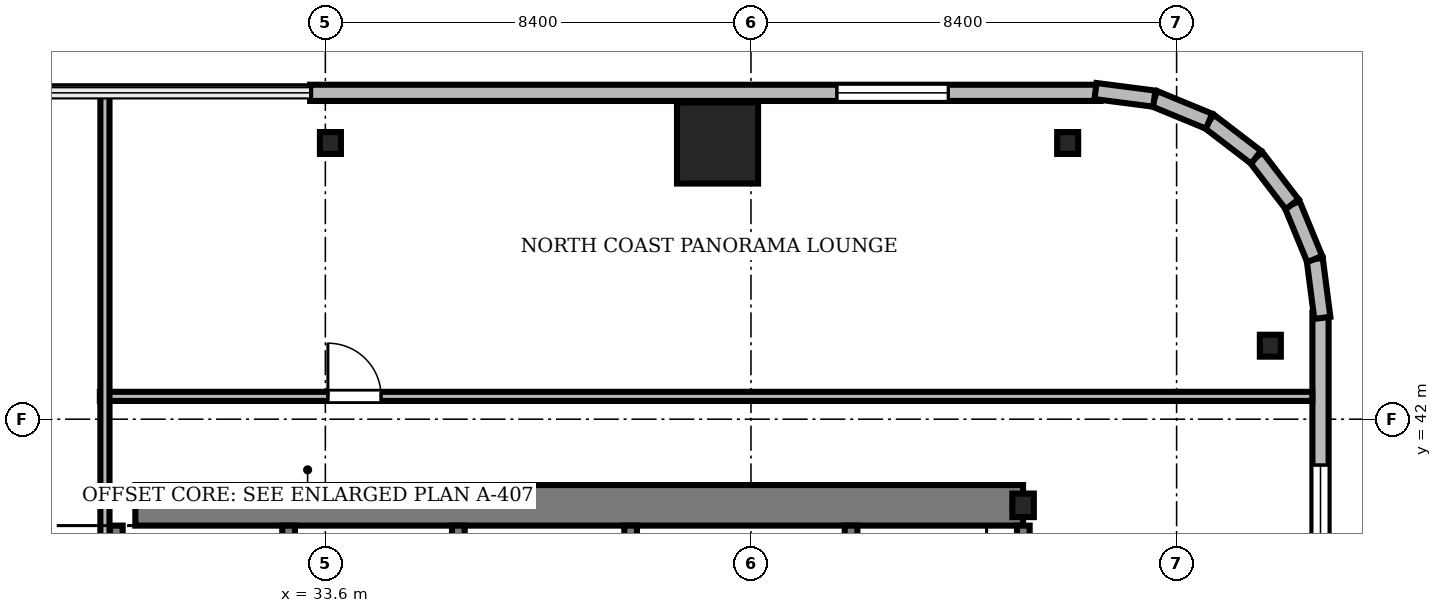
"""IFC4 building model, lengths in metres.
Left out: names, types, materials, properties, quantities, classifications, styles, units other than length and angle.
Written with IfcOpenShell. Run it as: python <this file> out.ifc"""

import sys

from ifc_helpers import new_model, si_unit, direction, frame, frame_2d, origin, origin_2d, place, context, subcontext, project, spatial, rectangle, i_section, extrude, source, transform, mapped, element, fill, save


model = new_model("IFC4")
c1 = context("Model", 3, precision=1e-05, world=origin(), true_north=direction((0.0, 1.0)))
c2 = subcontext(c1, "Body", "Model", "MODEL_VIEW")
j1 = project(units=[si_unit("LENGTHUNIT", "METRE"), si_unit("PLANEANGLEUNIT", "RADIAN")], contexts=[c1])
p1 = place(None, origin())
s1 = spatial("IfcSite", under=j1, at=p1, CompositionType="ELEMENT")
p2 = place(p1, origin())
s2 = spatial("IfcBuilding", under=s1, at=p2, CompositionType="ELEMENT")
p3 = place(p2, frame((0.0, 0.0, 122.4)))
s3 = spatial("IfcBuildingStorey", under=s2, at=p3, CompositionType="ELEMENT", Elevation=122.4)
m1 = source(origin(), c2, "Body", "SweptSolid", [
    extrude(rectangle(XDim=17.52, YDim=0.8, at=frame_2d((8.76, 0.0))), origin(), (0.0, 0.0, 1.0), 3.46),
])
p4 = place(p3, frame((29.85, 40.3, 0.0), z_axis=(0.0, 0.0, 1.0), x_axis=(1.0, 0.0, 0.0)))
e1 = element("IfcWall", 1, at=p4, inside=s3, PredefinedType="SHEAR", context=c2, shape_type="MappedRepresentation", body=[
    mapped(m1, transform((0.0, 0.0, 0.0), scale=1.0)),
])
m2 = source(origin(), c2, "Body", "SweptSolid", [
    extrude(i_section(OverallWidth=0.424, OverallDepth=0.465, WebThickness=0.035, FlangeThickness=0.056, FilletRadius=0.015, at=origin_2d()), origin(), (0.0, 0.0, 1.0), 3.46),
])
p5 = place(p3, frame((47.37, 40.3, 0.0), z_axis=(0.0, 0.0, 1.0), x_axis=(1.0, 0.0, 0.0)))
e2 = element("IfcColumn", 2, at=p5, inside=s3, PredefinedType="COLUMN", context=c2, shape_type="MappedRepresentation", body=[
    mapped(m2, transform((0.0, 0.0, 0.0), scale=1.0)),
])
m3 = source(origin(), c2, "Body", "SweptSolid", [
    extrude(rectangle(XDim=1.6, YDim=1.6, at=origin_2d()), origin(), (0.0, 0.0, 1.0), 3.46),
])
p6 = place(p3, frame((41.34, 47.45, 0.0), z_axis=(0.0, 0.0, 1.0), x_axis=(1.0, 0.0, 0.0)))
e3 = element("IfcColumn", 3, at=p6, inside=s3, PredefinedType="COLUMN", context=c2, shape_type="MappedRepresentation", body=[
    mapped(m3, transform((0.0, 0.0, 0.0), scale=1.0)),
])
m4 = source(origin(), c2, "Body", "SweptSolid", [
    extrude(i_section(OverallWidth=0.414, OverallDepth=0.432, WebThickness=0.026, FlangeThickness=0.04, FilletRadius=0.015, at=origin_2d()), origin(), (0.0, 0.0, 1.0), 3.46),
])
for number, where, z_axis, x_axis in (
    (4, (52.25, 43.45, 0.0), (0.0, 0.0, 1.0), (1.0, 0.0, 0.0)),
    (5, (48.25, 47.45, 0.0), (0.0, 0.0, 1.0), (1.0, 0.0, 0.0)),
    (6, (33.7, 47.45, 0.0), (0.0, 0.0, 1.0), (1.0, 0.0, 0.0)),
):
    element("IfcColumn", number, at=place(p3, frame(where, z_axis=z_axis, x_axis=x_axis)), inside=s3, PredefinedType="COLUMN", context=c2, shape_type="MappedRepresentation", body=[
        mapped(m4, transform((0.0, 0.0, 0.0), scale=1.0)),
    ])
m5 = source(origin(), c2, "Body", "SweptSolid", [
    extrude(rectangle(XDim=15.6, YDim=0.32, at=frame_2d((7.8, 0.0))), origin(), (0.0, 0.0, 1.0), 3.46),
])
p7 = place(p3, frame((48.9, 48.44, 0.0), z_axis=(0.0, 0.0, 1.0), x_axis=(-1.0, 0.0, 0.0)))
e7 = element("IfcWall", 7, at=p7, inside=s3, PredefinedType="SOLIDWALL", context=c2, shape_type="MappedRepresentation", body=[
    mapped(m5, transform((0.0, 0.0, 0.0), scale=1.0)),
])
m6 = source(origin(), c2, "Body", "SweptSolid", [
    extrude(rectangle(XDim=2.2, YDim=2.4, at=frame_2d((1.1, 1.2))), frame((0.0, 0.17, 0.0), z_axis=(0.0, -1.0, 0.0), x_axis=(1.0, 0.0, 0.0)), (0.0, 0.0, 1.0), 0.34),
])
p8 = place(p7, frame((3.005, 0.0, 0.72)))
e8 = element("IfcOpeningElement", 8, at=p8, cuts=e7, PredefinedType="OPENING", context=c2, shape_type="MappedRepresentation", body=[
    mapped(m6, transform((0.0, 0.0, 0.0), scale=1.0)),
])
m7 = source(origin(), c2, "Body", "SweptSolid", [
    extrude(rectangle(XDim=15.6, YDim=0.32, at=frame_2d((7.8, 0.0))), origin(), (0.0, 0.0, 1.0), 3.46),
])
p9 = place(p3, frame((53.24, 28.5, 0.0), z_axis=(0.0, 0.0, 1.0), x_axis=(0.0, 1.0, 0.0)))
e9 = element("IfcWall", 9, at=p9, inside=s3, PredefinedType="SOLIDWALL", context=c2, shape_type="MappedRepresentation", body=[
    mapped(m7, transform((0.0, 0.0, 0.0), scale=1.0)),
])
p10 = place(p9, frame((10.395, 0.0, 0.72)))
e10 = element("IfcOpeningElement", 10, at=p10, cuts=e9, PredefinedType="OPENING", context=c2, shape_type="MappedRepresentation", body=[
    mapped(m6, transform((0.0, 0.0, 0.0), scale=1.0)),
])
m8 = source(origin(), c2, "Body", "SweptSolid", [
    extrude(rectangle(XDim=1.17, YDim=0.32, at=frame_2d((0.585, 0.0))), origin(), (0.0, 0.0, 1.0), 3.46),
])
p11 = place(p3, frame((53.276, 44.0, 0.0), z_axis=(0.0, 0.0, 1.0), x_axis=(-0.128295670475, 0.991735963317, 0.0)))
e11 = element("IfcWall", 11, at=p11, inside=s3, PredefinedType="SOLIDWALL", context=c2, shape_type="MappedRepresentation", body=[
    mapped(m8, transform((0.0, 0.0, 0.0), scale=1.0)),
])
m9 = source(origin(), c2, "Body", "SweptSolid", [
    extrude(rectangle(XDim=1.169, YDim=0.32, at=frame_2d((0.584, 0.0))), origin(), (0.0, 0.0, 1.0), 3.46),
])
p12 = place(p3, frame((53.125, 45.16, 0.0), z_axis=(0.0, 0.0, 1.0), x_axis=(-0.381054331552, 0.924552646638, 0.0)))
e12 = element("IfcWall", 12, at=p12, inside=s3, PredefinedType="SOLIDWALL", context=c2, shape_type="MappedRepresentation", body=[
    mapped(m9, transform((0.0, 0.0, 0.0), scale=1.0)),
])
m10 = source(origin(), c2, "Body", "SweptSolid", [
    extrude(rectangle(XDim=1.169, YDim=0.32, at=frame_2d((0.584, 0.0))), origin(), (0.0, 0.0, 1.0), 3.46),
])
p13 = place(p3, frame((52.68, 46.241, 0.0), z_axis=(0.0, 0.0, 1.0), x_axis=(-0.608387696831, 0.793639975269, 0.0)))
e13 = element("IfcWall", 13, at=p13, inside=s3, PredefinedType="SOLIDWALL", context=c2, shape_type="MappedRepresentation", body=[
    mapped(m10, transform((0.0, 0.0, 0.0), scale=1.0)),
])
m11 = source(origin(), c2, "Body", "SweptSolid", [
    extrude(rectangle(XDim=1.169, YDim=0.32, at=frame_2d((0.584, 0.0))), origin(), (0.0, 0.0, 1.0), 3.46),
])
p14 = place(p3, frame((51.969, 47.169, 0.0), z_axis=(0.0, 0.0, 1.0), x_axis=(-0.793663520347, 0.608356981114, 0.0)))
e14 = element("IfcWall", 14, at=p14, inside=s3, PredefinedType="SOLIDWALL", context=c2, shape_type="MappedRepresentation", body=[
    mapped(m11, transform((0.0, 0.0, 0.0), scale=1.0)),
])
p15 = place(p3, frame((51.041, 47.88, 0.0), z_axis=(0.0, 0.0, 1.0), x_axis=(-0.924552646638, 0.381054331552, 0.0)))
e15 = element("IfcWall", 15, at=p15, inside=s3, PredefinedType="SOLIDWALL", context=c2, shape_type="MappedRepresentation", body=[
    mapped(m9, transform((0.0, 0.0, 0.0), scale=1.0)),
])
p16 = place(p3, frame((49.96, 48.325, 0.0), z_axis=(0.0, 0.0, 1.0), x_axis=(-0.991735963317, 0.128295670475, 0.0)))
e16 = element("IfcWall", 16, at=p16, inside=s3, PredefinedType="SOLIDWALL", context=c2, shape_type="MappedRepresentation", body=[
    mapped(m8, transform((0.0, 0.0, 0.0), scale=1.0)),
])
m12 = source(origin(), c2, "Body", "SweptSolid", [
    extrude(rectangle(XDim=9.25, YDim=0.25, at=frame_2d((4.625, 0.0))), origin(), (0.0, 0.0, 1.0), 3.5),
])
for number, where, z_axis, x_axis in (
    (17, (29.475, 30.65, 0.0), (0.0, 0.0, 1.0), (0.0, 1.0, 0.0)),
    (18, (32.875, 30.65, 0.0), (0.0, 0.0, 1.0), (0.0, 1.0, 0.0)),
    (19, (36.225, 30.65, 0.0), (0.0, 0.0, 1.0), (0.0, 1.0, 0.0)),
    (20, (39.625, 30.65, 0.0), (0.0, 0.0, 1.0), (0.0, 1.0, 0.0)),
    (21, (43.975, 30.65, 0.0), (0.0, 0.0, 1.0), (0.0, 1.0, 0.0)),
    (22, (47.375, 30.65, 0.0), (0.0, 0.0, 1.0), (0.0, 1.0, 0.0)),
):
    element("IfcWall", number, at=place(p3, frame(where, z_axis=z_axis, x_axis=x_axis)), inside=s3, PredefinedType="SOLIDWALL", context=c2, shape_type="MappedRepresentation", body=[
        mapped(m12, transform((0.0, 0.0, 0.0), scale=1.0)),
    ])
m13 = source(origin(), c2, "Body", "SweptSolid", [
    extrude(rectangle(XDim=23.928, YDim=0.18, at=frame_2d((11.964, 0.0))), origin(), (0.0, 0.0, 1.0), 2.702),
])
p17 = place(p3, frame((29.15, 42.45, 0.0), z_axis=(0.0, 0.0, 1.0), x_axis=(1.0, 0.0, 0.0)))
e23 = element("IfcWall", 23, at=p17, inside=s3, PredefinedType="PARTITIONING", context=c2, shape_type="MappedRepresentation", body=[
    mapped(m13, transform((0.0, 0.0, 0.0), scale=1.0)),
])
m14 = source(origin(), c2, "Body", "SweptSolid", [
    extrude(rectangle(XDim=1.05, YDim=2.2, at=frame_2d((0.525, 1.1))), frame((0.0, 0.1, 0.0), z_axis=(0.0, -1.0, 0.0), x_axis=(1.0, 0.0, 0.0)), (0.0, 0.0, 1.0), 0.2),
])
p18 = place(p17, frame((4.5, 0.0, 0.0)))
e24 = element("IfcOpeningElement", 24, at=p18, cuts=e23, PredefinedType="OPENING", context=c2, shape_type="MappedRepresentation", body=[
    mapped(m14, transform((0.0, 0.0, 0.0), scale=1.0)),
])
m15 = source(origin(), c2, "Body", "SweptSolid", [
    extrude(rectangle(XDim=11.45, YDim=0.18, at=frame_2d((5.725, 0.0))), origin(), (0.0, 0.0, 1.0), 2.702),
])
p19 = place(p3, frame((29.25, 37.02, 0.0), z_axis=(0.0, 0.0, 1.0), x_axis=(0.0, 1.0, 0.0)))
e25 = element("IfcWall", 25, at=p19, inside=s3, PredefinedType="PARTITIONING", context=c2, shape_type="MappedRepresentation", body=[
    mapped(m15, transform((0.0, 0.0, 0.0), scale=1.0)),
])
m16 = source(origin(), c2, "Body", "SweptSolid", [
    extrude(rectangle(XDim=2.2, YDim=2.4, at=frame_2d((1.1, 1.2))), frame((0.0, 0.03, 0.0), z_axis=(0.0, -1.0, 0.0), x_axis=(1.0, 0.0, 0.0)), (0.0, 0.0, 1.0), 0.06),
])
p20 = place(p8, origin())
e26 = element("IfcWindow", 26, at=p20, inside=s3, PartitioningType="SINGLE_PANEL", PredefinedType="WINDOW", context=c2, shape_type="MappedRepresentation", body=[
    mapped(m16, transform((0.0, 0.0, 0.0), scale=1.0)),
])
fill(e8, e26)
p21 = place(p10, origin())
e27 = element("IfcWindow", 27, at=p21, inside=s3, PartitioningType="SINGLE_PANEL", PredefinedType="WINDOW", context=c2, shape_type="MappedRepresentation", body=[
    mapped(m16, transform((0.0, 0.0, 0.0), scale=1.0)),
])
fill(e10, e27)
m17 = source(origin(), c2, "Body", "SweptSolid", [
    extrude(rectangle(XDim=1.05, YDim=2.2, at=frame_2d((0.525, 1.1))), frame((0.0, 0.025, 0.0), z_axis=(0.0, -1.0, 0.0), x_axis=(1.0, 0.0, 0.0)), (0.0, 0.0, 1.0), 0.05),
])
p22 = place(p18, origin())
e28 = element("IfcDoor", 28, at=p22, inside=s3, OperationType="SINGLE_SWING_LEFT", PredefinedType="DOOR", context=c2, shape_type="MappedRepresentation", body=[
    mapped(m17, transform((0.0, 0.0, 0.0), scale=1.0)),
])
fill(e24, e28)
save(model, sys.argv[1])
